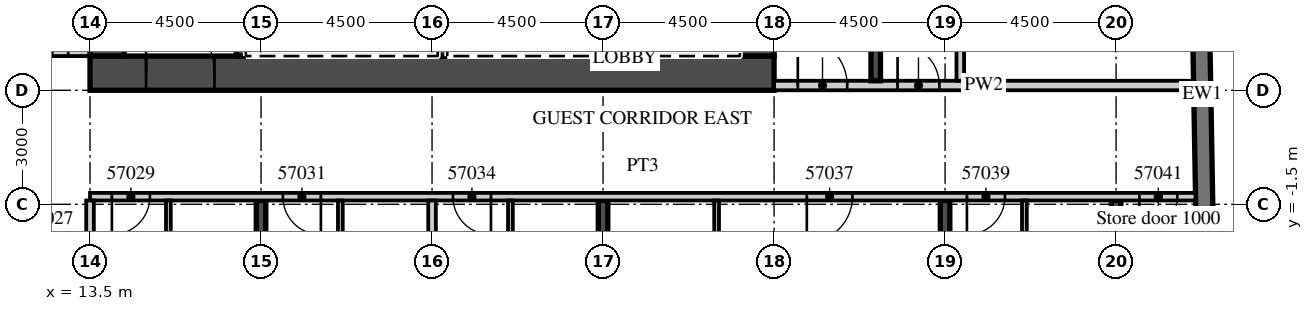
"""IFC4 building model, lengths in metres.
Left out: names, types, materials, properties, quantities, classifications, styles, units other than length and angle.
Written with IfcOpenShell. Run it as: python <this file> out.ifc"""

import sys

from ifc_helpers import new_model, si_unit, direction, frame, frame_2d, origin, place, context, subcontext, project, spatial, rectangle, extrude, element, fill, save


model = new_model("IFC4")
c1 = context("Model", 3, precision=1e-05, world=origin(), true_north=direction((0.0, 1.0)))
c2 = subcontext(c1, "Body", "Model", "MODEL_VIEW")
j1 = project(units=[si_unit("LENGTHUNIT", "METRE"), si_unit("PLANEANGLEUNIT", "RADIAN")], contexts=[c1])
p1 = place(None, origin())
s1 = spatial("IfcSite", under=j1, at=p1, CompositionType="ELEMENT")
p2 = place(p1, origin())
s2 = spatial("IfcBuilding", under=s1, at=p2, CompositionType="ELEMENT")
p3 = place(p2, frame((0.0, 0.0, 234.2)))
s3 = spatial("IfcBuildingStorey", under=s2, at=p3, CompositionType="ELEMENT", Elevation=234.2)
p4 = place(p3, frame((18.0, -19.079, 0.0), z_axis=(0.0, 0.0, 1.0), x_axis=(0.0, 1.0, 0.0)))
e1 = element("IfcWall", 1, at=p4, inside=s3, PredefinedType="SHEAR", context=c2, shape_type="SweptSolid", body=[
    extrude(rectangle(XDim=17.679, YDim=0.25, at=frame_2d((8.84, 0.0))), origin(), (0.0, 0.0, 1.0), 3.3),
])
p5 = place(p3, frame((27.0, -18.922, 0.0), z_axis=(0.0, 0.0, 1.0), x_axis=(0.0, 1.0, 0.0)))
e2 = element("IfcWall", 2, at=p5, inside=s3, PredefinedType="SHEAR", context=c2, shape_type="SweptSolid", body=[
    extrude(rectangle(XDim=17.522, YDim=0.25, at=frame_2d((8.761, 0.0))), origin(), (0.0, 0.0, 1.0), 3.3),
])
p6 = place(p3, frame((36.0, -18.765, 0.0), z_axis=(0.0, 0.0, 1.0), x_axis=(0.0, 1.0, 0.0)))
e3 = element("IfcWall", 3, at=p6, inside=s3, PredefinedType="SHEAR", context=c2, shape_type="SweptSolid", body=[
    extrude(rectangle(XDim=17.365, YDim=0.25, at=frame_2d((8.683, 0.0))), origin(), (0.0, 0.0, 1.0), 3.3),
])
p7 = place(p3, frame((40.5, -18.325, 0.0), z_axis=(0.0, 0.0, 1.0), x_axis=(0.0, 1.0, 0.0)))
e4 = element("IfcWall", 4, at=p7, inside=s3, PredefinedType="SHEAR", context=c2, shape_type="SweptSolid", body=[
    extrude(rectangle(XDim=16.925, YDim=0.25, at=frame_2d((8.463, 0.0))), origin(), (0.0, 0.0, 1.0), 3.3),
])
p8 = place(p3, frame((43.057, -15.103, 0.0), z_axis=(0.0, 0.0, 1.0), x_axis=(-0.017452408953, 0.999847695112, 0.0)))
e5 = element("IfcWall", 5, at=p8, inside=s3, PredefinedType="SOLIDWALL", context=c2, shape_type="SweptSolid", body=[
    extrude(rectangle(XDim=33.0, YDim=0.45, at=frame_2d((16.5, 0.0))), origin(), (0.0, 0.0, 1.0), 3.02),
])
p9 = place(p3, frame((-13.5, 2.5, 0.0), z_axis=(0.0, 0.0, 1.0), x_axis=(1.0, 0.0, 0.0)))
e6 = element("IfcWall", 6, at=p9, inside=s3, PredefinedType="PARTITIONING", context=c2, shape_type="SweptSolid", body=[
    extrude(rectangle(XDim=27.0, YDim=0.2, at=frame_2d((13.5, 0.0))), origin(), (0.0, 0.0, 1.0), 3.02),
])
p10 = place(p9, frame((2.925, 0.0, 0.0)))
e7 = element("IfcOpeningElement", 7, at=p10, cuts=e6, PredefinedType="OPENING", context=c2, shape_type="SweptSolid", body=[
    extrude(rectangle(XDim=1.0, YDim=2.1, at=frame_2d((0.5, 1.05))), frame((0.0, 0.11, 0.0), z_axis=(0.0, -1.0, 0.0), x_axis=(1.0, 0.0, 0.0)), (0.0, 0.0, 1.0), 0.22),
])
p11 = place(p9, frame((6.938, 0.0, 0.0)))
e8 = element("IfcOpeningElement", 8, at=p11, cuts=e6, PredefinedType="OPENING", context=c2, shape_type="SweptSolid", body=[
    extrude(rectangle(XDim=1.2, YDim=2.1, at=frame_2d((0.6, 1.05))), frame((0.0, 0.11, 0.0), z_axis=(0.0, -1.0, 0.0), x_axis=(1.0, 0.0, 0.0)), (0.0, 0.0, 1.0), 0.22),
])
p12 = place(p9, frame((14.075, 0.0, 0.0)))
e9 = element("IfcOpeningElement", 9, at=p12, cuts=e6, PredefinedType="OPENING", context=c2, shape_type="SweptSolid", body=[
    extrude(rectangle(XDim=1.0, YDim=2.1, at=frame_2d((0.5, 1.05))), frame((0.0, 0.11, 0.0), z_axis=(0.0, -1.0, 0.0), x_axis=(1.0, 0.0, 0.0)), (0.0, 0.0, 1.0), 0.22),
])
p13 = place(p9, frame((20.925, 0.0, 0.0)))
e10 = element("IfcOpeningElement", 10, at=p13, cuts=e6, PredefinedType="OPENING", context=c2, shape_type="SweptSolid", body=[
    extrude(rectangle(XDim=1.0, YDim=2.1, at=frame_2d((0.5, 1.05))), frame((0.0, 0.11, 0.0), z_axis=(0.0, -1.0, 0.0), x_axis=(1.0, 0.0, 0.0)), (0.0, 0.0, 1.0), 0.22),
])
p14 = place(p9, frame((25.425, 0.0, 0.0)))
e11 = element("IfcOpeningElement", 11, at=p14, cuts=e6, PredefinedType="OPENING", context=c2, shape_type="SweptSolid", body=[
    extrude(rectangle(XDim=1.0, YDim=2.1, at=frame_2d((0.5, 1.05))), frame((0.0, 0.11, 0.0), z_axis=(0.0, -1.0, 0.0), x_axis=(1.0, 0.0, 0.0)), (0.0, 0.0, 1.0), 0.22),
])
p15 = place(p3, frame((13.5, -1.3, 0.0), z_axis=(0.0, 0.0, 1.0), x_axis=(1.0, 0.0, 0.0)))
e12 = element("IfcWall", 12, at=p15, inside=s3, PredefinedType="PARTITIONING", context=c2, shape_type="SweptSolid", body=[
    extrude(rectangle(XDim=29.091, YDim=0.2, at=frame_2d((14.545, 0.0))), origin(), (0.0, 0.0, 1.0), 3.02),
])
p16 = place(p15, frame((0.575, 0.0, 0.0)))
e13 = element("IfcOpeningElement", 13, at=p16, cuts=e12, PredefinedType="OPENING", context=c2, shape_type="SweptSolid", body=[
    extrude(rectangle(XDim=1.0, YDim=2.1, at=frame_2d((0.5, 1.05))), frame((0.0, 0.11, 0.0), z_axis=(0.0, -1.0, 0.0), x_axis=(1.0, 0.0, 0.0)), (0.0, 0.0, 1.0), 0.22),
])
p17 = place(p15, frame((5.075, 0.0, 0.0)))
e14 = element("IfcOpeningElement", 14, at=p17, cuts=e12, PredefinedType="OPENING", context=c2, shape_type="SweptSolid", body=[
    extrude(rectangle(XDim=1.0, YDim=2.1, at=frame_2d((0.5, 1.05))), frame((0.0, 0.11, 0.0), z_axis=(0.0, -1.0, 0.0), x_axis=(1.0, 0.0, 0.0)), (0.0, 0.0, 1.0), 0.22),
])
p18 = place(p15, frame((9.55, 0.0, 0.0)))
e15 = element("IfcOpeningElement", 15, at=p18, cuts=e12, PredefinedType="OPENING", context=c2, shape_type="SweptSolid", body=[
    extrude(rectangle(XDim=1.0, YDim=2.1, at=frame_2d((0.5, 1.05))), frame((0.0, 0.11, 0.0), z_axis=(0.0, -1.0, 0.0), x_axis=(1.0, 0.0, 0.0)), (0.0, 0.0, 1.0), 0.22),
])
p19 = place(p15, frame((18.862, 0.0, 0.0)))
e16 = element("IfcOpeningElement", 16, at=p19, cuts=e12, PredefinedType="OPENING", context=c2, shape_type="SweptSolid", body=[
    extrude(rectangle(XDim=1.2, YDim=2.1, at=frame_2d((0.6, 1.05))), frame((0.0, 0.11, 0.0), z_axis=(0.0, -1.0, 0.0), x_axis=(1.0, 0.0, 0.0)), (0.0, 0.0, 1.0), 0.22),
])
p20 = place(p15, frame((23.075, 0.0, 0.0)))
e17 = element("IfcOpeningElement", 17, at=p20, cuts=e12, PredefinedType="OPENING", context=c2, shape_type="SweptSolid", body=[
    extrude(rectangle(XDim=1.0, YDim=2.1, at=frame_2d((0.5, 1.05))), frame((0.0, 0.11, 0.0), z_axis=(0.0, -1.0, 0.0), x_axis=(1.0, 0.0, 0.0)), (0.0, 0.0, 1.0), 0.22),
])
p21 = place(p15, frame((27.611, 0.0, 0.0)))
e18 = element("IfcOpeningElement", 18, at=p21, cuts=e12, PredefinedType="OPENING", context=c2, shape_type="SweptSolid", body=[
    extrude(rectangle(XDim=1.0, YDim=2.4, at=frame_2d((0.5, 1.2))), frame((0.0, 0.11, 0.0), z_axis=(0.0, -1.0, 0.0), x_axis=(1.0, 0.0, 0.0)), (0.0, 0.0, 1.0), 0.22),
])
p22 = place(p3, frame((13.5, -19.17, 0.0), z_axis=(0.0, 0.0, 1.0), x_axis=(0.0, 1.0, 0.0)))
e19 = element("IfcWall", 19, at=p22, inside=s3, PredefinedType="PARTITIONING", context=c2, shape_type="SweptSolid", body=[
    extrude(rectangle(XDim=17.77, YDim=0.2, at=frame_2d((8.885, 0.0))), origin(), (0.0, 0.0, 1.0), 3.02),
])
p23 = place(p3, frame((15.562, -7.125, 0.0), z_axis=(0.0, 0.0, 1.0), x_axis=(0.0, 1.0, 0.0)))
e20 = element("IfcWall", 20, at=p23, inside=s3, PredefinedType="PARTITIONING", context=c2, shape_type="SweptSolid", body=[
    extrude(rectangle(XDim=5.725, YDim=0.125, at=frame_2d((2.863, 0.0))), origin(), (0.0, 0.0, 1.0), 3.02),
])
p24 = place(p23, frame((2.375, 0.0, 0.0)))
e21 = element("IfcOpeningElement", 21, at=p24, cuts=e20, PredefinedType="OPENING", context=c2, shape_type="SweptSolid", body=[
    extrude(rectangle(XDim=0.9, YDim=2.1, at=frame_2d((0.45, 1.05))), frame((0.0, 0.073, 0.0), z_axis=(0.0, -1.0, 0.0), x_axis=(1.0, 0.0, 0.0)), (0.0, 0.0, 1.0), 0.145),
])
p25 = place(p3, frame((22.5, -19.013, 0.0), z_axis=(0.0, 0.0, 1.0), x_axis=(0.0, 1.0, 0.0)))
e22 = element("IfcWall", 22, at=p25, inside=s3, PredefinedType="PARTITIONING", context=c2, shape_type="SweptSolid", body=[
    extrude(rectangle(XDim=17.613, YDim=0.2, at=frame_2d((8.807, 0.0))), origin(), (0.0, 0.0, 1.0), 3.02),
])
p26 = place(p3, frame((20.087, -7.125, 0.0), z_axis=(0.0, 0.0, 1.0), x_axis=(0.0, 1.0, 0.0)))
e23 = element("IfcWall", 23, at=p26, inside=s3, PredefinedType="PARTITIONING", context=c2, shape_type="SweptSolid", body=[
    extrude(rectangle(XDim=5.725, YDim=0.125, at=frame_2d((2.863, 0.0))), origin(), (0.0, 0.0, 1.0), 3.02),
])
p27 = place(p26, frame((2.375, 0.0, 0.0)))
e24 = element("IfcOpeningElement", 24, at=p27, cuts=e23, PredefinedType="OPENING", context=c2, shape_type="SweptSolid", body=[
    extrude(rectangle(XDim=0.9, YDim=2.1, at=frame_2d((0.45, 1.05))), frame((0.0, 0.073, 0.0), z_axis=(0.0, -1.0, 0.0), x_axis=(1.0, 0.0, 0.0)), (0.0, 0.0, 1.0), 0.145),
])
p28 = place(p3, frame((24.562, -7.125, 0.0), z_axis=(0.0, 0.0, 1.0), x_axis=(0.0, 1.0, 0.0)))
e25 = element("IfcWall", 25, at=p28, inside=s3, PredefinedType="PARTITIONING", context=c2, shape_type="SweptSolid", body=[
    extrude(rectangle(XDim=5.725, YDim=0.125, at=frame_2d((2.863, 0.0))), origin(), (0.0, 0.0, 1.0), 3.02),
])
p29 = place(p28, frame((2.375, 0.0, 0.0)))
e26 = element("IfcOpeningElement", 26, at=p29, cuts=e25, PredefinedType="OPENING", context=c2, shape_type="SweptSolid", body=[
    extrude(rectangle(XDim=0.9, YDim=2.1, at=frame_2d((0.45, 1.05))), frame((0.0, 0.073, 0.0), z_axis=(0.0, -1.0, 0.0), x_axis=(1.0, 0.0, 0.0)), (0.0, 0.0, 1.0), 0.145),
])
p30 = place(p3, frame((29.988, -7.125, 0.0), z_axis=(0.0, 0.0, 1.0), x_axis=(0.0, 1.0, 0.0)))
e27 = element("IfcWall", 27, at=p30, inside=s3, PredefinedType="PARTITIONING", context=c2, shape_type="SweptSolid", body=[
    extrude(rectangle(XDim=5.725, YDim=0.125, at=frame_2d((2.863, 0.0))), origin(), (0.0, 0.0, 1.0), 3.02),
])
p31 = place(p30, frame((2.375, 0.0, 0.0)))
e28 = element("IfcOpeningElement", 28, at=p31, cuts=e27, PredefinedType="OPENING", context=c2, shape_type="SweptSolid", body=[
    extrude(rectangle(XDim=0.9, YDim=2.1, at=frame_2d((0.45, 1.05))), frame((0.0, 0.073, 0.0), z_axis=(0.0, -1.0, 0.0), x_axis=(1.0, 0.0, 0.0)), (0.0, 0.0, 1.0), 0.145),
])
p32 = place(p3, frame((38.087, -7.125, 0.0), z_axis=(0.0, 0.0, 1.0), x_axis=(0.0, 1.0, 0.0)))
e29 = element("IfcWall", 29, at=p32, inside=s3, PredefinedType="PARTITIONING", context=c2, shape_type="SweptSolid", body=[
    extrude(rectangle(XDim=5.725, YDim=0.125, at=frame_2d((2.863, 0.0))), origin(), (0.0, 0.0, 1.0), 3.02),
])
p33 = place(p32, frame((2.375, 0.0, 0.0)))
e30 = element("IfcOpeningElement", 30, at=p33, cuts=e29, PredefinedType="OPENING", context=c2, shape_type="SweptSolid", body=[
    extrude(rectangle(XDim=0.9, YDim=2.1, at=frame_2d((0.45, 1.05))), frame((0.0, 0.073, 0.0), z_axis=(0.0, -1.0, 0.0), x_axis=(1.0, 0.0, 0.0)), (0.0, 0.0, 1.0), 0.145),
])
p34 = place(p3, frame((13.5, 1.95, 0.0), z_axis=(0.0, 0.0, 1.0), x_axis=(1.0, 0.0, 0.0)))
e31 = element("IfcWall", 31, at=p34, inside=s3, PredefinedType="SHEAR", context=c2, shape_type="SweptSolid", body=[
    extrude(rectangle(XDim=18.0, YDim=0.9, at=frame_2d((9.0, 0.0))), origin(), (0.0, 0.0, 1.0), 3.02),
])
p35 = place(p34, frame((1.475, 0.0, 0.0)))
e32 = element("IfcOpeningElement", 32, at=p35, cuts=e31, PredefinedType="OPENING", context=c2, shape_type="SweptSolid", body=[
    extrude(rectangle(XDim=1.8, YDim=2.1, at=frame_2d((0.9, 1.05))), frame((0.0, 0.46, 0.0), z_axis=(0.0, -1.0, 0.0), x_axis=(1.0, 0.0, 0.0)), (0.0, 0.0, 1.0), 0.92),
])
p36 = place(p3, frame((31.05, 2.4, 0.0), z_axis=(0.0, 0.0, 1.0), x_axis=(0.0, 1.0, 0.0)))
e33 = element("IfcWall", 33, at=p36, inside=s3, PredefinedType="SHEAR", context=c2, shape_type="SweptSolid", body=[
    extrude(rectangle(XDim=12.8, YDim=0.9, at=frame_2d((6.4, 0.0))), origin(), (0.0, 0.0, 1.0), 3.02),
])
p37 = place(p36, frame((0.2, 0.0, 0.0)))
e34 = element("IfcOpeningElement", 34, at=p37, cuts=e33, PredefinedType="OPENING", context=c2, shape_type="SweptSolid", body=[
    extrude(rectangle(XDim=1.1, YDim=2.1, at=frame_2d((0.55, 1.05))), frame((0.0, 0.46, 0.0), z_axis=(0.0, -1.0, 0.0), x_axis=(1.0, 0.0, 0.0)), (0.0, 0.0, 1.0), 0.92),
])
p38 = place(p3, frame((13.95, 2.4, 0.0), z_axis=(0.0, 0.0, 1.0), x_axis=(0.0, 1.0, 0.0)))
e35 = element("IfcWall", 35, at=p38, inside=s3, PredefinedType="SHEAR", context=c2, shape_type="SweptSolid", body=[
    extrude(rectangle(XDim=12.2, YDim=0.9, at=frame_2d((6.1, 0.0))), origin(), (0.0, 0.0, 1.0), 3.02),
])
p39 = place(p3, frame((17.475, 2.4, 0.0), z_axis=(0.0, 0.0, 1.0), x_axis=(0.0, 1.0, 0.0)))
e36 = element("IfcWall", 36, at=p39, inside=s3, PredefinedType="SHEAR", context=c2, shape_type="SweptSolid", body=[
    extrude(rectangle(XDim=3.15, YDim=0.25, at=frame_2d((1.575, 0.0))), origin(), (0.0, 0.0, 1.0), 3.02),
])
for number, where, z_axis, x_axis in (
    (37, (27.975, 2.4, 0.0), (0.0, 0.0, 1.0), (0.0, 1.0, 0.0)),
    (38, (22.775, 2.4, 0.0), (0.0, 0.0, 1.0), (0.0, 1.0, 0.0)),
):
    element("IfcWall", number, at=place(p3, frame(where, z_axis=z_axis, x_axis=x_axis)), inside=s3, PredefinedType="SHEAR", context=c2, shape_type="SweptSolid", body=[
        extrude(rectangle(XDim=2.9, YDim=0.25, at=frame_2d((1.45, 0.0))), origin(), (0.0, 0.0, 1.0), 3.02),
    ])
p40 = place(p3, frame((31.5, 1.625, 0.0), z_axis=(0.0, 0.0, 1.0), x_axis=(1.0, 0.0, 0.0)))
e39 = element("IfcWall", 39, at=p40, inside=s3, PredefinedType="PARTITIONING", context=c2, shape_type="SweptSolid", body=[
    extrude(rectangle(XDim=11.04, YDim=0.25, at=frame_2d((5.52, 0.0))), origin(), (0.0, 0.0, 1.0), 3.02),
])
p41 = place(p40, frame((0.625, 0.0, 0.0)))
e40 = element("IfcOpeningElement", 40, at=p41, cuts=e39, PredefinedType="OPENING", context=c2, shape_type="SweptSolid", body=[
    extrude(rectangle(XDim=1.3, YDim=2.1, at=frame_2d((0.65, 1.05))), frame((0.0, 0.135, 0.0), z_axis=(0.0, -1.0, 0.0), x_axis=(1.0, 0.0, 0.0)), (0.0, 0.0, 1.0), 0.27),
])
p42 = place(p40, frame((3.25, 0.0, 0.0)))
e41 = element("IfcOpeningElement", 41, at=p42, cuts=e39, PredefinedType="OPENING", context=c2, shape_type="SweptSolid", body=[
    extrude(rectangle(XDim=1.1, YDim=2.1, at=frame_2d((0.55, 1.05))), frame((0.0, 0.135, 0.0), z_axis=(0.0, -1.0, 0.0), x_axis=(1.0, 0.0, 0.0)), (0.0, 0.0, 1.0), 0.27),
])
p43 = place(p3, frame((34.175, 1.75, 0.0), z_axis=(0.0, 0.0, 1.0), x_axis=(0.0, 1.0, 0.0)))
e42 = element("IfcWall", 42, at=p43, inside=s3, PredefinedType="SHEAR", context=c2, shape_type="SweptSolid", body=[
    extrude(rectangle(XDim=8.35, YDim=0.25, at=frame_2d((4.175, 0.0))), origin(), (0.0, 0.0, 1.0), 3.02),
])
p44 = place(p3, frame((36.4, 1.75, 0.0), z_axis=(0.0, 0.0, 1.0), x_axis=(0.0, 1.0, 0.0)))
e43 = element("IfcWall", 43, at=p44, inside=s3, PredefinedType="PARTITIONING", context=c2, shape_type="SweptSolid", body=[
    extrude(rectangle(XDim=15.95, YDim=0.2, at=frame_2d((7.975, 0.0))), origin(), (0.0, 0.0, 1.0), 3.02),
])
p45 = place(p44, frame((14.7, 0.0, 0.0)))
e44 = element("IfcOpeningElement", 44, at=p45, cuts=e43, PredefinedType="OPENING", context=c2, shape_type="SweptSolid", body=[
    extrude(rectangle(XDim=0.9, YDim=2.1, at=frame_2d((0.45, 1.05))), frame((0.0, 0.11, 0.0), z_axis=(0.0, -1.0, 0.0), x_axis=(1.0, 0.0, 0.0)), (0.0, 0.0, 1.0), 0.22),
])
p46 = place(p14, origin())
e45 = element("IfcDoor", 45, at=p46, inside=s3, OperationType="SINGLE_SWING_RIGHT", PredefinedType="DOOR", context=c2, shape_type="SweptSolid", body=[
    extrude(rectangle(XDim=1.0, YDim=2.1, at=frame_2d((0.5, 1.05))), frame((0.0, 0.025, 0.0), z_axis=(0.0, -1.0, 0.0), x_axis=(1.0, 0.0, 0.0)), (0.0, 0.0, 1.0), 0.05),
])
fill(e11, e45)
p47 = place(p16, origin())
e46 = element("IfcDoor", 46, at=p47, inside=s3, OperationType="SINGLE_SWING_LEFT", PredefinedType="DOOR", context=c2, shape_type="SweptSolid", body=[
    extrude(rectangle(XDim=1.0, YDim=2.1, at=frame_2d((0.5, 1.05))), frame((0.0, 0.025, 0.0), z_axis=(0.0, -1.0, 0.0), x_axis=(1.0, 0.0, 0.0)), (0.0, 0.0, 1.0), 0.05),
])
fill(e13, e46)
p48 = place(p17, origin())
e47 = element("IfcDoor", 47, at=p48, inside=s3, OperationType="SINGLE_SWING_RIGHT", PredefinedType="DOOR", context=c2, shape_type="SweptSolid", body=[
    extrude(rectangle(XDim=1.0, YDim=2.1, at=frame_2d((0.5, 1.05))), frame((0.0, 0.025, 0.0), z_axis=(0.0, -1.0, 0.0), x_axis=(1.0, 0.0, 0.0)), (0.0, 0.0, 1.0), 0.05),
])
fill(e14, e47)
p49 = place(p18, origin())
e48 = element("IfcDoor", 48, at=p49, inside=s3, OperationType="SINGLE_SWING_RIGHT", PredefinedType="DOOR", context=c2, shape_type="SweptSolid", body=[
    extrude(rectangle(XDim=1.0, YDim=2.1, at=frame_2d((0.5, 1.05))), frame((0.0, 0.025, 0.0), z_axis=(0.0, -1.0, 0.0), x_axis=(1.0, 0.0, 0.0)), (0.0, 0.0, 1.0), 0.05),
])
fill(e15, e48)
p50 = place(p19, origin())
e49 = element("IfcDoor", 49, at=p50, inside=s3, OperationType="SINGLE_SWING_LEFT", PredefinedType="DOOR", context=c2, shape_type="SweptSolid", body=[
    extrude(rectangle(XDim=1.2, YDim=2.1, at=frame_2d((0.6, 1.05))), frame((0.0, 0.025, 0.0), z_axis=(0.0, -1.0, 0.0), x_axis=(1.0, 0.0, 0.0)), (0.0, 0.0, 1.0), 0.05),
])
fill(e16, e49)
p51 = place(p20, origin())
e50 = element("IfcDoor", 50, at=p51, inside=s3, OperationType="SINGLE_SWING_LEFT", PredefinedType="DOOR", context=c2, shape_type="SweptSolid", body=[
    extrude(rectangle(XDim=1.0, YDim=2.1, at=frame_2d((0.5, 1.05))), frame((0.0, 0.025, 0.0), z_axis=(0.0, -1.0, 0.0), x_axis=(1.0, 0.0, 0.0)), (0.0, 0.0, 1.0), 0.05),
])
fill(e17, e50)
p52 = place(p21, origin())
e51 = element("IfcDoor", 51, at=p52, inside=s3, OperationType="SINGLE_SWING_LEFT", PredefinedType="DOOR", context=c2, shape_type="SweptSolid", body=[
    extrude(rectangle(XDim=1.0, YDim=2.4, at=frame_2d((0.5, 1.2))), frame((0.0, 0.025, 0.0), z_axis=(0.0, -1.0, 0.0), x_axis=(1.0, 0.0, 0.0)), (0.0, 0.0, 1.0), 0.05),
])
fill(e18, e51)
p53 = place(p35, origin())
e52 = element("IfcDoor", 52, at=p53, inside=s3, OperationType="DOUBLE_DOOR_DOUBLE_SWING", PredefinedType="DOOR", context=c2, shape_type="SweptSolid", body=[
    extrude(rectangle(XDim=1.8, YDim=2.1, at=frame_2d((0.9, 1.05))), frame((0.0, 0.025, 0.0), z_axis=(0.0, -1.0, 0.0), x_axis=(1.0, 0.0, 0.0)), (0.0, 0.0, 1.0), 0.05),
])
fill(e32, e52)
p54 = place(p41, origin())
e53 = element("IfcDoor", 53, at=p54, inside=s3, OperationType="SINGLE_SWING_LEFT", PredefinedType="DOOR", context=c2, shape_type="SweptSolid", body=[
    extrude(rectangle(XDim=1.3, YDim=2.1, at=frame_2d((0.65, 1.05))), frame((0.0, 0.025, 0.0), z_axis=(0.0, -1.0, 0.0), x_axis=(1.0, 0.0, 0.0)), (0.0, 0.0, 1.0), 0.05),
])
fill(e40, e53)
p55 = place(p42, origin())
e54 = element("IfcDoor", 54, at=p55, inside=s3, OperationType="SINGLE_SWING_LEFT", PredefinedType="DOOR", context=c2, shape_type="SweptSolid", body=[
    extrude(rectangle(XDim=1.1, YDim=2.1, at=frame_2d((0.55, 1.05))), frame((0.0, 0.025, 0.0), z_axis=(0.0, -1.0, 0.0), x_axis=(1.0, 0.0, 0.0)), (0.0, 0.0, 1.0), 0.05),
])
fill(e41, e54)
save(model, sys.argv[1])
